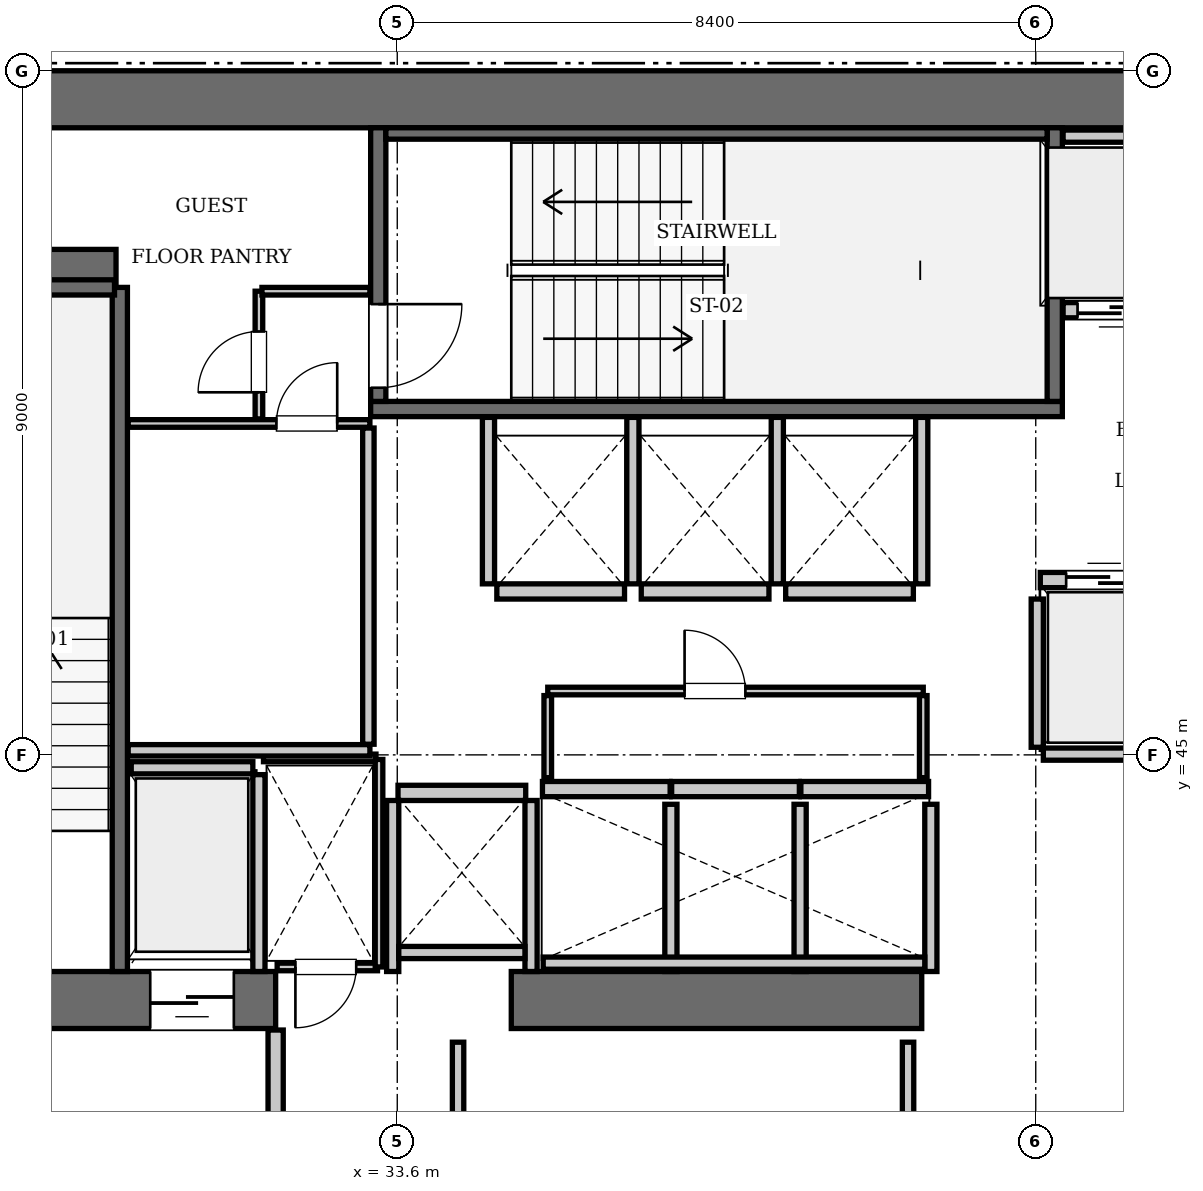
"""IFC4 building model, lengths in metres.
Left out: names, types, materials, properties, quantities, classifications, styles, units other than length and angle.
Written with IfcOpenShell. Run it as: python <this file> out.ifc"""

import sys

from ifc_helpers import new_model, si_unit, direction, frame, frame_2d, origin, place, context, subcontext, project, spatial, rectangle, extrude, element, fill, save


model = new_model("IFC4")
c1 = context("Model", 3, precision=1e-05, world=origin(), true_north=direction((0.0, 1.0)))
c2 = subcontext(c1, "Body", "Model", "MODEL_VIEW")
j1 = project(units=[si_unit("LENGTHUNIT", "METRE"), si_unit("PLANEANGLEUNIT", "RADIAN")], contexts=[c1])
p1 = place(None, origin())
s1 = spatial("IfcSite", under=j1, at=p1, CompositionType="ELEMENT")
p2 = place(p1, origin())
s2 = spatial("IfcBuilding", under=s1, at=p2, CompositionType="ELEMENT")
p3 = place(p2, frame((0.0, 0.0, 185.15)))
s3 = spatial("IfcBuildingStorey", under=s2, at=p3, CompositionType="ELEMENT", Elevation=185.15)
p4 = place(p3, frame((25.2, 53.625, 0.0), z_axis=(0.0, 0.0, 1.0), x_axis=(1.0, 0.0, 0.0)))
e1 = element("IfcWall", 1, at=p4, inside=s3, PredefinedType="SHEAR", context=c2, shape_type="SweptSolid", body=[
    extrude(rectangle(XDim=25.2, YDim=0.75, at=frame_2d((12.6, 0.0))), origin(), (0.0, 0.0, 1.0), 3.85),
])
p5 = place(p3, frame((25.2, 41.775, 0.0), z_axis=(0.0, 0.0, 1.0), x_axis=(1.0, 0.0, 0.0)))
e2 = element("IfcWall", 2, at=p5, inside=s3, PredefinedType="SHEAR", context=c2, shape_type="SweptSolid", body=[
    extrude(rectangle(XDim=6.8, YDim=0.75, at=frame_2d((3.4, 0.0))), origin(), (0.0, 0.0, 1.0), 3.85),
])
p6 = place(p5, frame((1.65, 0.0, 0.0)))
e3 = element("IfcOpeningElement", 3, at=p6, cuts=e2, PredefinedType="OPENING", context=c2, shape_type="SweptSolid", body=[
    extrude(rectangle(XDim=1.15, YDim=2.15, at=frame_2d((0.575, 1.075))), frame((0.0, 0.385, 0.0), z_axis=(0.0, -1.0, 0.0), x_axis=(1.0, 0.0, 0.0)), (0.0, 0.0, 1.0), 0.77),
])
p7 = place(p5, frame((5.15, 0.0, 0.0)))
e4 = element("IfcOpeningElement", 4, at=p7, cuts=e2, PredefinedType="OPENING", context=c2, shape_type="SweptSolid", body=[
    extrude(rectangle(XDim=1.1, YDim=2.2, at=frame_2d((0.55, 1.1))), frame((0.0, 0.385, 0.0), z_axis=(0.0, -1.0, 0.0), x_axis=(1.0, 0.0, 0.0)), (0.0, 0.0, 1.0), 0.77),
])
p8 = place(p3, frame((35.1, 41.775, 0.0), z_axis=(0.0, 0.0, 1.0), x_axis=(1.0, 0.0, 0.0)))
e5 = element("IfcWall", 5, at=p8, inside=s3, PredefinedType="SHEAR", context=c2, shape_type="SweptSolid", body=[
    extrude(rectangle(XDim=5.4, YDim=0.75, at=frame_2d((2.7, 0.0))), origin(), (0.0, 0.0, 1.0), 3.85),
])
p9 = place(p3, frame((25.95, 51.4, 0.0), z_axis=(0.0, 0.0, 1.0), x_axis=(1.0, 0.0, 0.0)))
e6 = element("IfcWall", 6, at=p9, inside=s3, PredefinedType="SHEAR", context=c2, shape_type="SweptSolid", body=[
    extrude(rectangle(XDim=3.95, YDim=0.5, at=frame_2d((1.975, 0.0))), origin(), (0.0, 0.0, 1.0), 3.85),
])
p10 = place(p3, frame((29.95, 42.15, 0.0), z_axis=(0.0, 0.0, 1.0), x_axis=(0.0, 1.0, 0.0)))
e7 = element("IfcWall", 7, at=p10, inside=s3, PredefinedType="SOLIDWALL", context=c2, shape_type="SweptSolid", body=[
    extrude(rectangle(XDim=9.0, YDim=0.2, at=frame_2d((4.5, 0.0))), origin(), (0.0, 0.0, 1.0), 3.61),
])
p11 = place(p3, frame((26.38, 51.15, 0.0), z_axis=(0.0, 0.0, 1.0), x_axis=(1.0, 0.0, 0.0)))
e8 = element("IfcWall", 8, at=p11, inside=s3, PredefinedType="SOLIDWALL", context=c2, shape_type="SweptSolid", body=[
    extrude(rectangle(XDim=3.5, YDim=0.2, at=frame_2d((1.75, 0.0))), origin(), (0.0, 0.0, 1.0), 3.61),
])
p12 = place(p3, frame((33.25, 49.55, 0.0), z_axis=(0.0, 0.0, 1.0), x_axis=(1.0, 0.0, 0.0)))
e9 = element("IfcWall", 9, at=p12, inside=s3, PredefinedType="SOLIDWALL", context=c2, shape_type="SweptSolid", body=[
    extrude(rectangle(XDim=9.1, YDim=0.2, at=frame_2d((4.55, 0.0))), origin(), (0.0, 0.0, 1.0), 3.61),
])
p13 = place(p3, frame((42.25, 49.65, 0.0), z_axis=(0.0, 0.0, 1.0), x_axis=(0.0, 1.0, 0.0)))
e10 = element("IfcWall", 10, at=p13, inside=s3, PredefinedType="SOLIDWALL", context=c2, shape_type="SweptSolid", body=[
    extrude(rectangle(XDim=3.6, YDim=0.2, at=frame_2d((1.8, 0.0))), origin(), (0.0, 0.0, 1.0), 3.61),
])
p14 = place(p3, frame((33.35, 49.65, 0.0), z_axis=(0.0, 0.0, 1.0), x_axis=(0.0, 1.0, 0.0)))
e11 = element("IfcWall", 11, at=p14, inside=s3, PredefinedType="SOLIDWALL", context=c2, shape_type="SweptSolid", body=[
    extrude(rectangle(XDim=3.6, YDim=0.2, at=frame_2d((1.8, 0.0))), origin(), (0.0, 0.0, 1.0), 3.61),
])
p15 = place(p14, frame((0.18, 0.0, 0.0)))
e12 = element("IfcOpeningElement", 12, at=p15, cuts=e11, PredefinedType="OPENING", context=c2, shape_type="SweptSolid", body=[
    extrude(rectangle(XDim=1.1, YDim=2.15, at=frame_2d((0.55, 1.075))), frame((0.0, 0.11, 0.0), z_axis=(0.0, -1.0, 0.0), x_axis=(1.0, 0.0, 0.0)), (0.0, 0.0, 1.0), 0.22),
])
p16 = place(p3, frame((33.45, 53.175, 0.0), z_axis=(0.0, 0.0, 1.0), x_axis=(1.0, 0.0, 0.0)))
e13 = element("IfcWall", 13, at=p16, inside=s3, PredefinedType="SOLIDWALL", context=c2, shape_type="SweptSolid", body=[
    extrude(rectangle(XDim=8.7, YDim=0.15, at=frame_2d((4.35, 0.0))), origin(), (0.0, 0.0, 1.0), 3.61),
])
p17 = place(p3, frame((42.06, 47.3, 0.0), z_axis=(0.0, 0.0, 1.0), x_axis=(1.0, 0.0, 0.0)))
e14 = element("IfcWall", 14, at=p17, inside=s3, PredefinedType="SOLIDWALL", context=c2, shape_type="SweptSolid", body=[
    extrude(rectangle(XDim=1.68, YDim=0.2, at=frame_2d((0.84, 0.0))), origin(), (0.0, 0.0, 1.0), 3.61),
])
p18 = place(p17, frame((0.34, 0.0, 0.0)))
e15 = element("IfcOpeningElement", 15, at=p18, cuts=e14, PredefinedType="OPENING", context=c2, shape_type="SweptSolid", body=[
    extrude(rectangle(XDim=1.0, YDim=2.15, at=frame_2d((0.5, 1.075))), frame((0.0, 0.11, 0.0), z_axis=(0.0, -1.0, 0.0), x_axis=(1.0, 0.0, 0.0)), (0.0, 0.0, 1.0), 0.22),
])
p19 = place(p3, frame((42.36, 50.85, 0.0), z_axis=(0.0, 0.0, 1.0), x_axis=(1.0, 0.0, 0.0)))
e16 = element("IfcWall", 16, at=p19, inside=s3, PredefinedType="SOLIDWALL", context=c2, shape_type="SweptSolid", body=[
    extrude(rectangle(XDim=1.38, YDim=0.2, at=frame_2d((0.69, 0.0))), origin(), (0.0, 0.0, 1.0), 3.61),
])
p20 = place(p19, frame((0.19, 0.0, 0.0)))
e17 = element("IfcOpeningElement", 17, at=p20, cuts=e16, PredefinedType="OPENING", context=c2, shape_type="SweptSolid", body=[
    extrude(rectangle(XDim=1.0, YDim=2.15, at=frame_2d((0.5, 1.075))), frame((0.0, 0.11, 0.0), z_axis=(0.0, -1.0, 0.0), x_axis=(1.0, 0.0, 0.0)), (0.0, 0.0, 1.0), 0.22),
])
for number, where, z_axis, x_axis in (
    (18, (35.51, 44.55, 0.0), (0.0, 0.0, 1.0), (1.0, 0.0, 0.0)),
    (19, (37.21, 44.55, 0.0), (0.0, 0.0, 1.0), (1.0, 0.0, 0.0)),
):
    element("IfcWall", number, at=place(p3, frame(where, z_axis=z_axis, x_axis=x_axis)), inside=s3, PredefinedType="SOLIDWALL", context=c2, shape_type="SweptSolid", body=[
        extrude(rectangle(XDim=1.68, YDim=0.2, at=frame_2d((0.84, 0.0))), origin(), (0.0, 0.0, 1.0), 3.61),
    ])
for number, where, z_axis, x_axis in (
    (20, (38.91, 44.55, 0.0), (0.0, 0.0, 1.0), (1.0, 0.0, 0.0)),
    (21, (34.91, 47.15, 0.0), (0.0, 0.0, 1.0), (1.0, 0.0, 0.0)),
):
    element("IfcWall", number, at=place(p3, frame(where, z_axis=z_axis, x_axis=x_axis)), inside=s3, PredefinedType="SOLIDWALL", context=c2, shape_type="SweptSolid", body=[
        extrude(rectangle(XDim=1.68, YDim=0.2, at=frame_2d((0.84, 0.0))), origin(), (0.0, 0.0, 1.0), 3.61),
    ])
for number, where, z_axis, x_axis in (
    (22, (36.81, 47.15, 0.0), (0.0, 0.0, 1.0), (1.0, 0.0, 0.0)),
    (23, (38.71, 47.15, 0.0), (0.0, 0.0, 1.0), (1.0, 0.0, 0.0)),
    (24, (33.61, 44.5, 0.0), (0.0, 0.0, 1.0), (1.0, 0.0, 0.0)),
):
    element("IfcWall", number, at=place(p3, frame(where, z_axis=z_axis, x_axis=x_axis)), inside=s3, PredefinedType="SOLIDWALL", context=c2, shape_type="SweptSolid", body=[
        extrude(rectangle(XDim=1.68, YDim=0.2, at=frame_2d((0.84, 0.0))), origin(), (0.0, 0.0, 1.0), 3.61),
    ])
p21 = place(p3, frame((30.1, 44.83, 0.0), z_axis=(0.0, 0.0, 1.0), x_axis=(1.0, 0.0, 0.0)))
e25 = element("IfcWall", 25, at=p21, inside=s3, PredefinedType="SOLIDWALL", context=c2, shape_type="SweptSolid", body=[
    extrude(rectangle(XDim=1.6, YDim=0.16, at=frame_2d((0.8, 0.0))), origin(), (0.0, 0.0, 1.0), 3.61),
])
p22 = place(p3, frame((31.78, 42.15, 0.0), z_axis=(0.0, 0.0, 1.0), x_axis=(0.0, 1.0, 0.0)))
e26 = element("IfcWall", 26, at=p22, inside=s3, PredefinedType="SOLIDWALL", context=c2, shape_type="SweptSolid", body=[
    extrude(rectangle(XDim=2.59, YDim=0.16, at=frame_2d((1.295, 0.0))), origin(), (0.0, 0.0, 1.0), 3.61),
])
p23 = place(p3, frame((42.02, 45.1, 0.0), z_axis=(0.0, 0.0, 1.0), x_axis=(0.0, 1.0, 0.0)))
e27 = element("IfcWall", 27, at=p23, inside=s3, PredefinedType="SOLIDWALL", context=c2, shape_type="SweptSolid", body=[
    extrude(rectangle(XDim=1.95, YDim=0.16, at=frame_2d((0.975, 0.0))), origin(), (0.0, 0.0, 1.0), 3.61),
])
p24 = place(p3, frame((42.1, 45.01, 0.0), z_axis=(0.0, 0.0, 1.0), x_axis=(1.0, 0.0, 0.0)))
e28 = element("IfcWall", 28, at=p24, inside=s3, PredefinedType="SOLIDWALL", context=c2, shape_type="SweptSolid", body=[
    extrude(rectangle(XDim=3.45, YDim=0.16, at=frame_2d((1.725, 0.0))), origin(), (0.0, 0.0, 1.0), 3.61),
])
p25 = place(p3, frame((42.36, 53.14, 0.0), z_axis=(0.0, 0.0, 1.0), x_axis=(1.0, 0.0, 0.0)))
e29 = element("IfcWall", 29, at=p25, inside=s3, PredefinedType="SOLIDWALL", context=c2, shape_type="SweptSolid", body=[
    extrude(rectangle(XDim=3.14, YDim=0.16, at=frame_2d((1.57, 0.0))), origin(), (0.0, 0.0, 1.0), 3.61),
])
for number, where, z_axis, x_axis in (
    (30, (37.2, 42.15, 0.0), (0.0, 0.0, 1.0), (0.0, 1.0, 0.0)),
    (31, (38.9, 42.15, 0.0), (0.0, 0.0, 1.0), (0.0, 1.0, 0.0)),
    (32, (40.62, 42.15, 0.0), (0.0, 0.0, 1.0), (0.0, 1.0, 0.0)),
):
    element("IfcWall", number, at=place(p3, frame(where, z_axis=z_axis, x_axis=x_axis)), inside=s3, PredefinedType="SOLIDWALL", context=c2, shape_type="SweptSolid", body=[
        extrude(rectangle(XDim=2.2, YDim=0.16, at=frame_2d((1.1, 0.0))), origin(), (0.0, 0.0, 1.0), 3.61),
    ])
p26 = place(p3, frame((35.52, 42.26, 0.0), z_axis=(0.0, 0.0, 1.0), x_axis=(1.0, 0.0, 0.0)))
e33 = element("IfcWall", 33, at=p26, inside=s3, PredefinedType="SOLIDWALL", context=c2, shape_type="SweptSolid", body=[
    extrude(rectangle(XDim=5.02, YDim=0.16, at=frame_2d((2.51, 0.0))), origin(), (0.0, 0.0, 1.0), 3.61),
])
for number, where, z_axis, x_axis in (
    (34, (34.8, 47.25, 0.0), (0.0, 0.0, 1.0), (0.0, 1.0, 0.0)),
    (35, (36.7, 47.25, 0.0), (0.0, 0.0, 1.0), (0.0, 1.0, 0.0)),
    (36, (38.6, 47.25, 0.0), (0.0, 0.0, 1.0), (0.0, 1.0, 0.0)),
    (37, (40.5, 47.25, 0.0), (0.0, 0.0, 1.0), (0.0, 1.0, 0.0)),
):
    element("IfcWall", number, at=place(p3, frame(where, z_axis=z_axis, x_axis=x_axis)), inside=s3, PredefinedType="SOLIDWALL", context=c2, shape_type="SweptSolid", body=[
        extrude(rectangle(XDim=2.19, YDim=0.16, at=frame_2d((1.095, 0.0))), origin(), (0.0, 0.0, 1.0), 3.61),
    ])
for number, where, z_axis, x_axis in (
    (38, (33.54, 42.15, 0.0), (0.0, 0.0, 1.0), (0.0, 1.0, 0.0)),
    (39, (35.36, 42.15, 0.0), (0.0, 0.0, 1.0), (0.0, 1.0, 0.0)),
):
    element("IfcWall", number, at=place(p3, frame(where, z_axis=z_axis, x_axis=x_axis)), inside=s3, PredefinedType="SOLIDWALL", context=c2, shape_type="SweptSolid", body=[
        extrude(rectangle(XDim=2.25, YDim=0.16, at=frame_2d((1.125, 0.0))), origin(), (0.0, 0.0, 1.0), 3.61),
    ])
p27 = place(p3, frame((33.62, 42.4, 0.0), z_axis=(0.0, 0.0, 1.0), x_axis=(1.0, 0.0, 0.0)))
e40 = element("IfcWall", 40, at=p27, inside=s3, PredefinedType="SOLIDWALL", context=c2, shape_type="SweptSolid", body=[
    extrude(rectangle(XDim=1.66, YDim=0.16, at=frame_2d((0.83, 0.0))), origin(), (0.0, 0.0, 1.0), 3.61),
])
p28 = place(p3, frame((32.0, 38.31, 0.0), z_axis=(0.0, 0.0, 1.0), x_axis=(0.0, 1.0, 0.0)))
e41 = element("IfcWall", 41, at=p28, inside=s3, PredefinedType="PARTITIONING", context=c2, shape_type="SweptSolid", body=[
    extrude(rectangle(XDim=3.07, YDim=0.2, at=frame_2d((1.535, 0.0))), origin(), (0.0, 0.0, 1.0), 3.61),
])
p29 = place(p3, frame((32.02, 42.21, 0.0), z_axis=(0.0, 0.0, 1.0), x_axis=(1.0, 0.0, 0.0)))
e42 = element("IfcWall", 42, at=p29, inside=s3, PredefinedType="PARTITIONING", context=c2, shape_type="SweptSolid", body=[
    extrude(rectangle(XDim=1.32, YDim=0.1, at=frame_2d((0.66, 0.0))), origin(), (0.0, 0.0, 1.0), 3.61),
])
p30 = place(p29, frame((0.24, 0.0, 0.0)))
e43 = element("IfcOpeningElement", 43, at=p30, cuts=e42, PredefinedType="OPENING", context=c2, shape_type="SweptSolid", body=[
    extrude(rectangle(XDim=0.8, YDim=2.05, at=frame_2d((0.4, 1.025))), frame((0.0, 0.06, 0.0), z_axis=(0.0, -1.0, 0.0), x_axis=(1.0, 0.0, 0.0)), (0.0, 0.0, 1.0), 0.12),
])
p31 = place(p3, frame((31.84, 44.96, 0.0), z_axis=(0.0, 0.0, 1.0), x_axis=(1.0, 0.0, 0.0)))
e44 = element("IfcWall", 44, at=p31, inside=s3, PredefinedType="PARTITIONING", context=c2, shape_type="SweptSolid", body=[
    extrude(rectangle(XDim=1.48, YDim=0.1, at=frame_2d((0.74, 0.0))), origin(), (0.0, 0.0, 1.0), 3.61),
])
p32 = place(p3, frame((33.36, 42.21, 0.0), z_axis=(0.0, 0.0, 1.0), x_axis=(0.0, 1.0, 0.0)))
e45 = element("IfcWall", 45, at=p32, inside=s3, PredefinedType="PARTITIONING", context=c2, shape_type="SweptSolid", body=[
    extrude(rectangle(XDim=2.73, YDim=0.1, at=frame_2d((1.365, 0.0))), origin(), (0.0, 0.0, 1.0), 3.61),
])
p33 = place(p3, frame((35.58, 45.84, 0.0), z_axis=(0.0, 0.0, 1.0), x_axis=(1.0, 0.0, 0.0)))
e46 = element("IfcWall", 46, at=p33, inside=s3, PredefinedType="PARTITIONING", context=c2, shape_type="SweptSolid", body=[
    extrude(rectangle(XDim=4.94, YDim=0.1, at=frame_2d((2.47, 0.0))), origin(), (0.0, 0.0, 1.0), 3.61),
])
p34 = place(p33, frame((1.8, 0.0, 0.0)))
e47 = element("IfcOpeningElement", 47, at=p34, cuts=e46, PredefinedType="OPENING", context=c2, shape_type="SweptSolid", body=[
    extrude(rectangle(XDim=0.8, YDim=2.05, at=frame_2d((0.4, 1.025))), frame((0.0, 0.06, 0.0), z_axis=(0.0, -1.0, 0.0), x_axis=(1.0, 0.0, 0.0)), (0.0, 0.0, 1.0), 0.12),
])
for number, where, z_axis, x_axis in (
    (48, (35.58, 44.7, 0.0), (0.0, 0.0, 1.0), (0.0, 1.0, 0.0)),
    (49, (40.52, 44.7, 0.0), (0.0, 0.0, 1.0), (0.0, 1.0, 0.0)),
):
    element("IfcWall", number, at=place(p3, frame(where, z_axis=z_axis, x_axis=x_axis)), inside=s3, PredefinedType="PARTITIONING", context=c2, shape_type="SweptSolid", body=[
        extrude(rectangle(XDim=1.08, YDim=0.1, at=frame_2d((0.54, 0.0))), origin(), (0.0, 0.0, 1.0), 3.61),
    ])
p35 = place(p3, frame((30.06, 45.06, 0.0), z_axis=(0.0, 0.0, 1.0), x_axis=(1.0, 0.0, 0.0)))
e50 = element("IfcWall", 50, at=p35, inside=s3, PredefinedType="PARTITIONING", context=c2, shape_type="SweptSolid", body=[
    extrude(rectangle(XDim=3.18, YDim=0.15, at=frame_2d((1.59, 0.0))), origin(), (0.0, 0.0, 1.0), 3.61),
])
p36 = place(p3, frame((33.22, 45.14, 0.0), z_axis=(0.0, 0.0, 1.0), x_axis=(0.0, 1.0, 0.0)))
e51 = element("IfcWall", 51, at=p36, inside=s3, PredefinedType="PARTITIONING", context=c2, shape_type="SweptSolid", body=[
    extrude(rectangle(XDim=4.16, YDim=0.15, at=frame_2d((2.08, 0.0))), origin(), (0.0, 0.0, 1.0), 3.61),
])
p37 = place(p3, frame((30.06, 49.36, 0.0), z_axis=(0.0, 0.0, 1.0), x_axis=(1.0, 0.0, 0.0)))
e52 = element("IfcWall", 52, at=p37, inside=s3, PredefinedType="PARTITIONING", context=c2, shape_type="SweptSolid", body=[
    extrude(rectangle(XDim=3.18, YDim=0.1, at=frame_2d((1.59, 0.0))), origin(), (0.0, 0.0, 1.0), 3.61),
])
p38 = place(p37, frame((1.95, 0.0, 0.0)))
e53 = element("IfcOpeningElement", 53, at=p38, cuts=e52, PredefinedType="OPENING", context=c2, shape_type="SweptSolid", body=[
    extrude(rectangle(XDim=0.8, YDim=2.05, at=frame_2d((0.4, 1.025))), frame((0.0, 0.06, 0.0), z_axis=(0.0, -1.0, 0.0), x_axis=(1.0, 0.0, 0.0)), (0.0, 0.0, 1.0), 0.12),
])
p39 = place(p3, frame((31.78, 49.42, 0.0), z_axis=(0.0, 0.0, 1.0), x_axis=(0.0, 1.0, 0.0)))
e54 = element("IfcWall", 54, at=p39, inside=s3, PredefinedType="PARTITIONING", context=c2, shape_type="SweptSolid", body=[
    extrude(rectangle(XDim=1.68, YDim=0.1, at=frame_2d((0.84, 0.0))), origin(), (0.0, 0.0, 1.0), 3.61),
])
p40 = place(p39, frame((0.35, 0.0, 0.0)))
e55 = element("IfcOpeningElement", 55, at=p40, cuts=e54, PredefinedType="OPENING", context=c2, shape_type="SweptSolid", body=[
    extrude(rectangle(XDim=0.8, YDim=2.05, at=frame_2d((0.4, 1.025))), frame((0.0, 0.06, 0.0), z_axis=(0.0, -1.0, 0.0), x_axis=(1.0, 0.0, 0.0)), (0.0, 0.0, 1.0), 0.12),
])
p41 = place(p3, frame((31.82, 51.1, 0.0), z_axis=(0.0, 0.0, 1.0), x_axis=(1.0, 0.0, 0.0)))
e56 = element("IfcWall", 56, at=p41, inside=s3, PredefinedType="PARTITIONING", context=c2, shape_type="SweptSolid", body=[
    extrude(rectangle(XDim=1.42, YDim=0.1, at=frame_2d((0.71, 0.0))), origin(), (0.0, 0.0, 1.0), 3.61),
])
for number, where, z_axis, x_axis in (
    (57, (34.4, 38.38, 0.0), (0.0, 0.0, 1.0), (0.0, 1.0, 0.0)),
    (58, (40.32, 38.38, 0.0), (0.0, 0.0, 1.0), (0.0, 1.0, 0.0)),
):
    element("IfcWall", number, at=place(p3, frame(where, z_axis=z_axis, x_axis=x_axis)), inside=s3, PredefinedType="PARTITIONING", context=c2, shape_type="SweptSolid", body=[
        extrude(rectangle(XDim=2.84, YDim=0.15, at=frame_2d((1.42, 0.0))), origin(), (0.0, 0.0, 1.0), 3.61),
    ])
p42 = place(p15, frame((1.1, 0.0, 0.0), z_axis=(0.0, 0.0, 1.0), x_axis=(-1.0, 0.0, 0.0)))
e59 = element("IfcDoor", 59, at=p42, inside=s3, OperationType="SINGLE_SWING_LEFT", PredefinedType="DOOR", context=c2, shape_type="SweptSolid", body=[
    extrude(rectangle(XDim=1.1, YDim=2.15, at=frame_2d((0.55, 1.075))), frame((0.0, 0.025, 0.0), z_axis=(0.0, -1.0, 0.0), x_axis=(1.0, 0.0, 0.0)), (0.0, 0.0, 1.0), 0.05),
])
fill(e12, e59)
p43 = place(p18, origin())
e60 = element("IfcDoor", 60, at=p43, inside=s3, OperationType="SLIDING_TO_LEFT", PredefinedType="DOOR", context=c2, shape_type="SweptSolid", body=[
    extrude(rectangle(XDim=1.0, YDim=2.15, at=frame_2d((0.5, 1.075))), frame((0.0, 0.025, 0.0), z_axis=(0.0, -1.0, 0.0), x_axis=(1.0, 0.0, 0.0)), (0.0, 0.0, 1.0), 0.05),
])
fill(e15, e60)
p44 = place(p20, frame((1.0, 0.0, 0.0), z_axis=(0.0, 0.0, 1.0), x_axis=(-1.0, 0.0, 0.0)))
e61 = element("IfcDoor", 61, at=p44, inside=s3, OperationType="SLIDING_TO_LEFT", PredefinedType="DOOR", context=c2, shape_type="SweptSolid", body=[
    extrude(rectangle(XDim=1.0, YDim=2.15, at=frame_2d((0.5, 1.075))), frame((0.0, 0.025, 0.0), z_axis=(0.0, -1.0, 0.0), x_axis=(1.0, 0.0, 0.0)), (0.0, 0.0, 1.0), 0.05),
])
fill(e17, e61)
p45 = place(p7, frame((1.1, 0.0, 0.0), z_axis=(0.0, 0.0, 1.0), x_axis=(-1.0, 0.0, 0.0)))
e62 = element("IfcDoor", 62, at=p45, inside=s3, OperationType="SLIDING_TO_LEFT", PredefinedType="DOOR", context=c2, shape_type="SweptSolid", body=[
    extrude(rectangle(XDim=1.1, YDim=2.2, at=frame_2d((0.55, 1.1))), frame((0.0, 0.025, 0.0), z_axis=(0.0, -1.0, 0.0), x_axis=(1.0, 0.0, 0.0)), (0.0, 0.0, 1.0), 0.05),
])
fill(e4, e62)
p46 = place(p30, frame((0.8, 0.0, 0.0), z_axis=(0.0, 0.0, 1.0), x_axis=(-1.0, 0.0, 0.0)))
e63 = element("IfcDoor", 63, at=p46, inside=s3, OperationType="SINGLE_SWING_RIGHT", PredefinedType="DOOR", context=c2, shape_type="SweptSolid", body=[
    extrude(rectangle(XDim=0.8, YDim=2.05, at=frame_2d((0.4, 1.025))), frame((0.0, 0.025, 0.0), z_axis=(0.0, -1.0, 0.0), x_axis=(1.0, 0.0, 0.0)), (0.0, 0.0, 1.0), 0.05),
])
fill(e43, e63)
p47 = place(p34, origin())
e64 = element("IfcDoor", 64, at=p47, inside=s3, OperationType="SINGLE_SWING_LEFT", PredefinedType="DOOR", context=c2, shape_type="SweptSolid", body=[
    extrude(rectangle(XDim=0.8, YDim=2.05, at=frame_2d((0.4, 1.025))), frame((0.0, 0.025, 0.0), z_axis=(0.0, -1.0, 0.0), x_axis=(1.0, 0.0, 0.0)), (0.0, 0.0, 1.0), 0.05),
])
fill(e47, e64)
p48 = place(p38, origin())
e65 = element("IfcDoor", 65, at=p48, inside=s3, OperationType="SINGLE_SWING_RIGHT", PredefinedType="DOOR", context=c2, shape_type="SweptSolid", body=[
    extrude(rectangle(XDim=0.8, YDim=2.05, at=frame_2d((0.4, 1.025))), frame((0.0, 0.025, 0.0), z_axis=(0.0, -1.0, 0.0), x_axis=(1.0, 0.0, 0.0)), (0.0, 0.0, 1.0), 0.05),
])
fill(e53, e65)
p49 = place(p40, origin())
e66 = element("IfcDoor", 66, at=p49, inside=s3, OperationType="SINGLE_SWING_LEFT", PredefinedType="DOOR", context=c2, shape_type="SweptSolid", body=[
    extrude(rectangle(XDim=0.8, YDim=2.05, at=frame_2d((0.4, 1.025))), frame((0.0, 0.025, 0.0), z_axis=(0.0, -1.0, 0.0), x_axis=(1.0, 0.0, 0.0)), (0.0, 0.0, 1.0), 0.05),
])
fill(e55, e66)
save(model, sys.argv[1])
